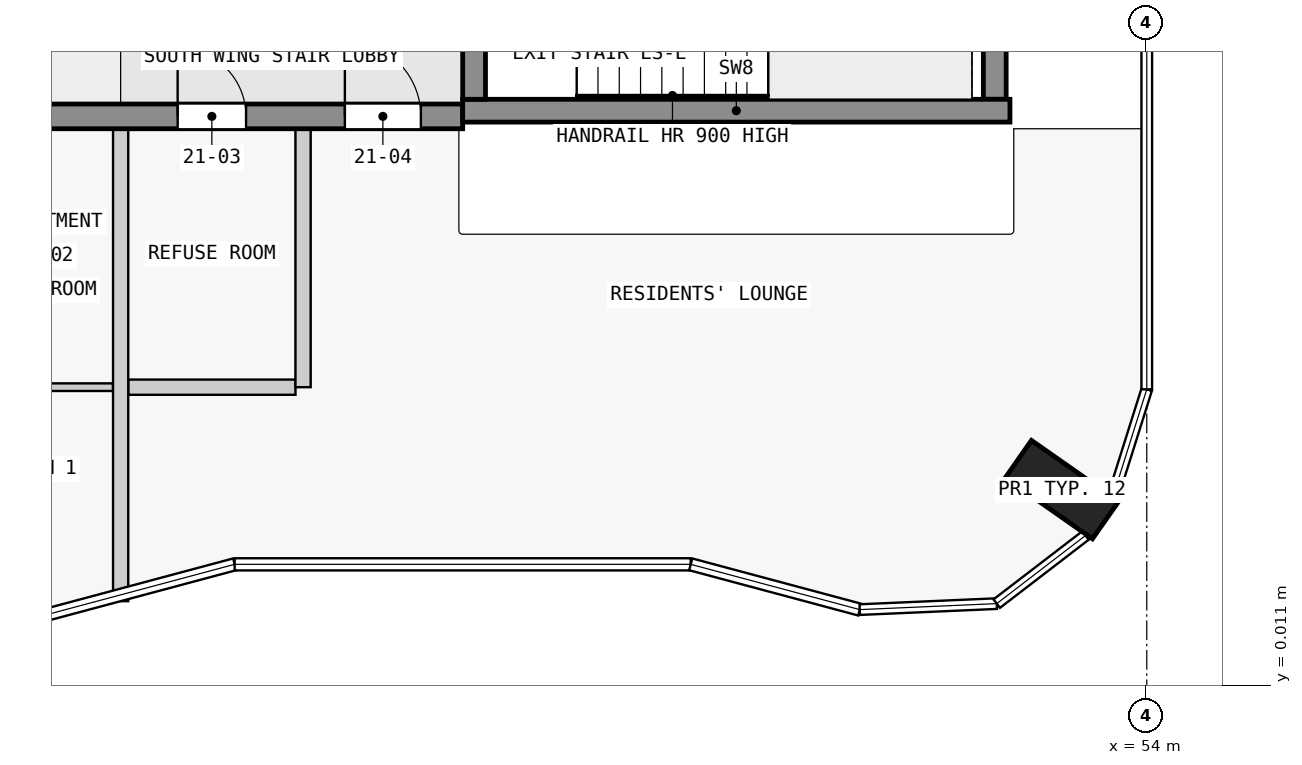
"""IFC4 building model, lengths in metres.
Left out: names, types, materials, properties, quantities, classifications, styles, units other than length and angle.
Written with IfcOpenShell. Run it as: python <this file> out.ifc"""

import sys

from ifc_helpers import new_model, si_unit, direction, frame, frame_2d, origin, origin_2d, place, context, subcontext, project, spatial, rectangle, extrude, element, fill, save


model = new_model("IFC4")
c1 = context("Model", 3, precision=1e-05, world=origin(), true_north=direction((0.0, 1.0)))
c2 = subcontext(c1, "Body", "Model", "MODEL_VIEW")
j1 = project(units=[si_unit("LENGTHUNIT", "METRE"), si_unit("PLANEANGLEUNIT", "RADIAN")], contexts=[c1])
p1 = place(None, origin())
s1 = spatial("IfcSite", under=j1, at=p1, CompositionType="ELEMENT")
p2 = place(p1, origin())
s2 = spatial("IfcBuilding", under=s1, at=p2, CompositionType="ELEMENT")
p3 = place(p2, frame((0.0, 0.0, 85.3)))
s3 = spatial("IfcBuildingStorey", under=s2, at=p3, CompositionType="ELEMENT", Elevation=85.3)
p4 = place(p3, frame((52.884, 2.59, 0.0), z_axis=(0.0, 0.0, 1.0), x_axis=(0.573542637991, 0.819175709117, 0.0)))
e1 = element("IfcColumn", 1, at=p4, inside=s3, PredefinedType="COLUMN", context=c2, shape_type="SweptSolid", body=[
    extrude(rectangle(XDim=0.6, YDim=1.4, at=origin_2d()), origin(), (0.0, 0.0, 1.0), 3.5),
])
p5 = place(p3, frame((45.15, 7.725, 0.0), z_axis=(0.0, 0.0, 1.0), x_axis=(0.0, 1.0, 0.0)))
e2 = element("IfcWall", 2, at=p5, inside=s3, PredefinedType="SHEAR", context=c2, shape_type="SweptSolid", body=[
    extrude(rectangle(XDim=2.55, YDim=0.3, at=frame_2d((1.275, 0.0))), origin(), (0.0, 0.0, 1.0), 3.5),
])
p6 = place(p5, frame((0.725, 0.0, 0.0)))
e3 = element("IfcOpeningElement", 3, at=p6, cuts=e2, PredefinedType="OPENING", context=c2, shape_type="SweptSolid", body=[
    extrude(rectangle(XDim=1.1, YDim=2.1, at=frame_2d((0.55, 1.05))), frame((0.0, 0.16, 0.0), z_axis=(0.0, -1.0, 0.0), x_axis=(1.0, 0.0, 0.0)), (0.0, 0.0, 1.0), 0.32),
])
p7 = place(p3, frame((52.0, 7.725, 0.0), z_axis=(0.0, 0.0, 1.0), x_axis=(0.0, 1.0, 0.0)))
e4 = element("IfcWall", 4, at=p7, inside=s3, PredefinedType="SHEAR", context=c2, shape_type="SweptSolid", body=[
    extrude(rectangle(XDim=2.55, YDim=0.3, at=frame_2d((1.275, 0.0))), origin(), (0.0, 0.0, 1.0), 3.5),
])
p8 = place(p3, frame((45.0, 7.575, 0.0), z_axis=(0.0, 0.0, 1.0), x_axis=(1.0, 0.0, 0.0)))
e5 = element("IfcWall", 5, at=p8, inside=s3, PredefinedType="SHEAR", context=c2, shape_type="SweptSolid", body=[
    extrude(rectangle(XDim=7.2, YDim=0.3, at=frame_2d((3.6, 0.0))), origin(), (0.0, 0.0, 1.0), 3.5),
])
p9 = place(p3, frame((22.5, 7.5, 0.0), z_axis=(0.0, 0.0, 1.0), x_axis=(1.0, 0.0, 0.0)))
e6 = element("IfcWall", 6, at=p9, inside=s3, PredefinedType="SHEAR", context=c2, shape_type="SweptSolid", body=[
    extrude(rectangle(XDim=22.5, YDim=0.325, at=frame_2d((11.25, 0.0))), origin(), (0.0, 0.0, 1.0), 3.25),
])
p10 = place(p9, frame((4.05, 0.0, 0.0)))
e7 = element("IfcOpeningElement", 7, at=p10, cuts=e6, PredefinedType="OPENING", context=c2, shape_type="SweptSolid", body=[
    extrude(rectangle(XDim=1.0, YDim=2.1, at=frame_2d((0.5, 1.05))), frame((0.0, 0.172, 0.0), z_axis=(0.0, -1.0, 0.0), x_axis=(1.0, 0.0, 0.0)), (0.0, 0.0, 1.0), 0.345),
])
p11 = place(p9, frame((13.05, 0.0, 0.0)))
e8 = element("IfcOpeningElement", 8, at=p11, cuts=e6, PredefinedType="OPENING", context=c2, shape_type="SweptSolid", body=[
    extrude(rectangle(XDim=1.0, YDim=2.1, at=frame_2d((0.5, 1.05))), frame((0.0, 0.172, 0.0), z_axis=(0.0, -1.0, 0.0), x_axis=(1.0, 0.0, 0.0)), (0.0, 0.0, 1.0), 0.345),
])
p12 = place(p9, frame((18.75, 0.0, 0.0)))
e9 = element("IfcOpeningElement", 9, at=p12, cuts=e6, PredefinedType="OPENING", context=c2, shape_type="SweptSolid", body=[
    extrude(rectangle(XDim=0.9, YDim=2.1, at=frame_2d((0.45, 1.05))), frame((0.0, 0.172, 0.0), z_axis=(0.0, -1.0, 0.0), x_axis=(1.0, 0.0, 0.0)), (0.0, 0.0, 1.0), 0.345),
])
p13 = place(p9, frame((20.95, 0.0, 0.0)))
e10 = element("IfcOpeningElement", 10, at=p13, cuts=e6, PredefinedType="OPENING", context=c2, shape_type="SweptSolid", body=[
    extrude(rectangle(XDim=1.0, YDim=2.1, at=frame_2d((0.5, 1.05))), frame((0.0, 0.172, 0.0), z_axis=(0.0, -1.0, 0.0), x_axis=(1.0, 0.0, 0.0)), (0.0, 0.0, 1.0), 0.345),
])
p14 = place(p3, frame((38.75, 3.938, 0.0), z_axis=(0.0, 0.0, 1.0), x_axis=(1.0, 0.0, 0.0)))
e11 = element("IfcWall", 11, at=p14, inside=s3, PredefinedType="PARTITIONING", context=c2, shape_type="SweptSolid", body=[
    extrude(rectangle(XDim=1.65, YDim=0.1, at=frame_2d((0.825, 0.0))), origin(), (0.0, 0.0, 1.0), 3.25),
])
p15 = place(p3, frame((40.6, 3.938, 0.0), z_axis=(0.0, 0.0, 1.0), x_axis=(1.0, 0.0, 0.0)))
e12 = element("IfcWall", 12, at=p15, inside=s3, PredefinedType="PARTITIONING", context=c2, shape_type="SweptSolid", body=[
    extrude(rectangle(XDim=2.2, YDim=0.2, at=frame_2d((1.1, 0.0))), origin(), (0.0, 0.0, 1.0), 3.25),
])
p16 = place(p3, frame((40.5, 1.122, 0.0), z_axis=(0.0, 0.0, 1.0), x_axis=(0.0, 1.0, 0.0)))
e13 = element("IfcWall", 13, at=p16, inside=s3, PredefinedType="PARTITIONING", context=c2, shape_type="SweptSolid", body=[
    extrude(rectangle(XDim=6.215, YDim=0.2, at=frame_2d((3.107, 0.0))), origin(), (0.0, 0.0, 1.0), 3.25),
])
p17 = place(p3, frame((42.9, 3.938, 0.0), z_axis=(0.0, 0.0, 1.0), x_axis=(0.0, 1.0, 0.0)))
e14 = element("IfcWall", 14, at=p17, inside=s3, PredefinedType="PARTITIONING", context=c2, shape_type="SweptSolid", body=[
    extrude(rectangle(XDim=3.4, YDim=0.2, at=frame_2d((1.7, 0.0))), origin(), (0.0, 0.0, 1.0), 3.25),
])
p18 = place(p12, origin())
e15 = element("IfcDoor", 15, at=p18, inside=s3, OperationType="SINGLE_SWING_RIGHT", PredefinedType="DOOR", context=c2, shape_type="SweptSolid", body=[
    extrude(rectangle(XDim=0.9, YDim=2.1, at=frame_2d((0.45, 1.05))), frame((0.0, 0.025, 0.0), z_axis=(0.0, -1.0, 0.0), x_axis=(1.0, 0.0, 0.0)), (0.0, 0.0, 1.0), 0.05),
])
fill(e9, e15)
p19 = place(p13, origin())
e16 = element("IfcDoor", 16, at=p19, inside=s3, OperationType="SINGLE_SWING_RIGHT", PredefinedType="DOOR", context=c2, shape_type="SweptSolid", body=[
    extrude(rectangle(XDim=1.0, YDim=2.1, at=frame_2d((0.5, 1.05))), frame((0.0, 0.025, 0.0), z_axis=(0.0, -1.0, 0.0), x_axis=(1.0, 0.0, 0.0)), (0.0, 0.0, 1.0), 0.05),
])
fill(e10, e16)
save(model, sys.argv[1])
